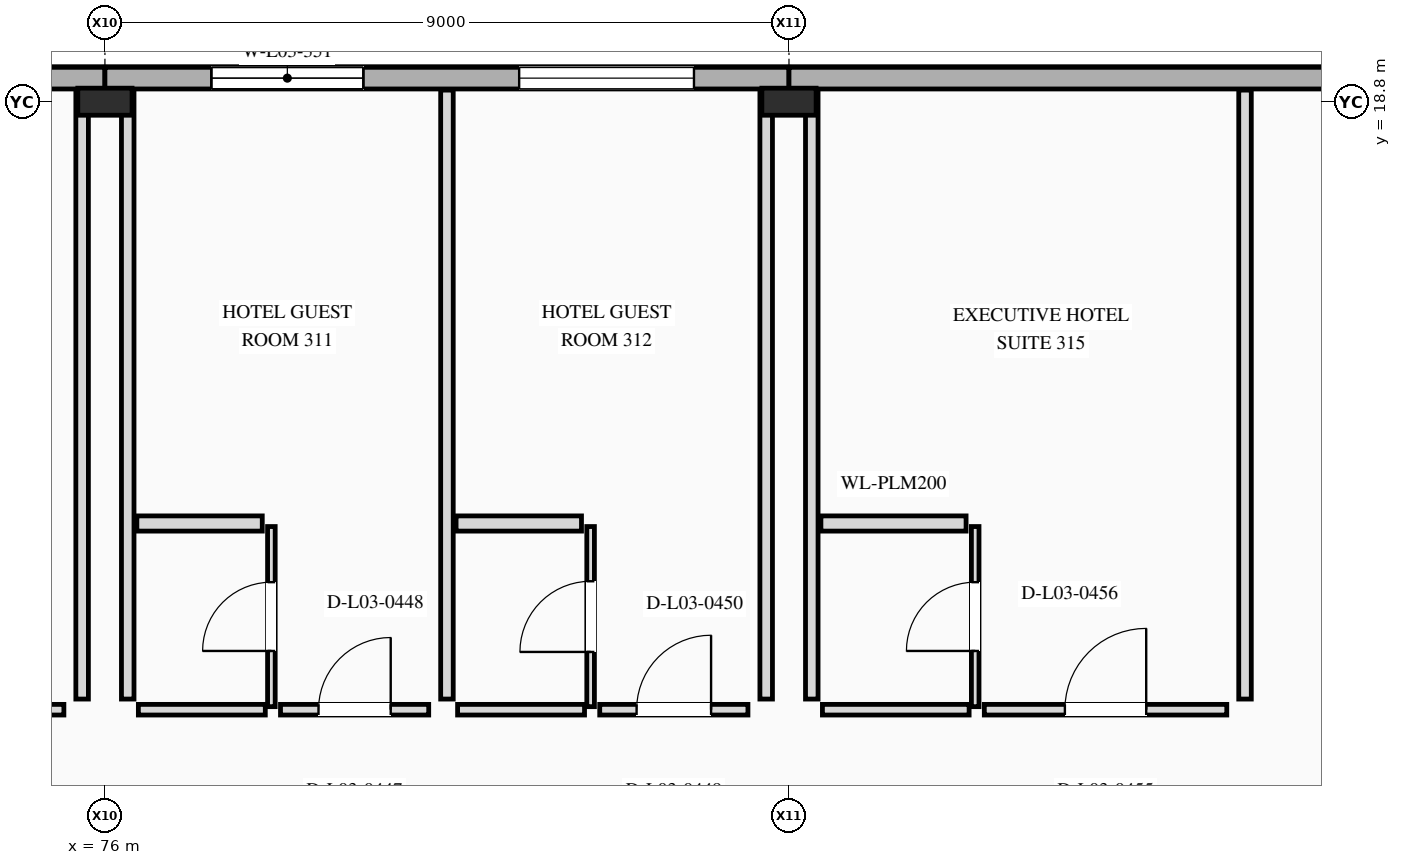
"""IFC4 building model, lengths in metres.
Left out: names, types, materials, properties, quantities, classifications, styles, units other than length and angle.
Written with IfcOpenShell. Run it as: python <this file> out.ifc"""

import sys

from ifc_helpers import new_model, si_unit, direction, frame, frame_2d, origin, origin_2d, place, context, subcontext, project, spatial, rectangle, i_section, extrude, element, fill, save


model = new_model("IFC4")
c1 = context("Model", 3, precision=1e-05, world=origin(), true_north=direction((0.0, 1.0)))
c2 = subcontext(c1, "Body", "Model", "MODEL_VIEW")
j1 = project(units=[si_unit("LENGTHUNIT", "METRE"), si_unit("PLANEANGLEUNIT", "RADIAN")], contexts=[c1])
p1 = place(None, origin())
s1 = spatial("IfcSite", under=j1, at=p1, CompositionType="ELEMENT")
p2 = place(p1, origin())
s2 = spatial("IfcBuilding", under=s1, at=p2, CompositionType="ELEMENT")
p3 = place(p2, frame((0.0, 0.0, 15.6)))
s3 = spatial("IfcBuildingStorey", under=s2, at=p3, CompositionType="ELEMENT", Elevation=15.6)
for number, where, z_axis, x_axis in (
    (1, (76.0, 18.8, 0.0), (0.0, 0.0, 1.0), (0.0, 1.0, 0.0)),
    (2, (85.0, 18.8, 0.0), (0.0, 0.0, 1.0), (0.0, 1.0, 0.0)),
):
    element("IfcColumn", number, at=place(p3, frame(where, z_axis=z_axis, x_axis=x_axis)), inside=s3, PredefinedType="COLUMN", context=c2, shape_type="SweptSolid", body=[
        extrude(i_section(OverallWidth=0.356, OverallDepth=0.714, WebThickness=0.019, FlangeThickness=0.034, at=origin_2d()), origin(), (0.0, 0.0, 1.0), 3.9),
    ])
p4 = place(p3, frame((76.0, 19.11, 0.0), z_axis=(0.0, 0.0, 1.0), x_axis=(-1.0, 0.0, 0.0)))
e3 = element("IfcWall", 3, at=p4, inside=s3, PredefinedType="STANDARD", context=c2, shape_type="SweptSolid", body=[
    extrude(rectangle(XDim=9.0, YDim=0.285, at=frame_2d((4.5, 0.0))), origin(), (0.0, 0.0, 1.0), 3.9),
])
p5 = place(p4, frame((3.675, 0.0, 0.85)))
e4 = element("IfcOpeningElement", 4, at=p5, cuts=e3, PredefinedType="OPENING", context=c2, shape_type="SweptSolid", body=[
    extrude(rectangle(XDim=1.65, YDim=1.75, at=frame_2d((0.825, 0.875))), frame((0.0, 0.152, 0.0), z_axis=(0.0, -1.0, 0.0), x_axis=(1.0, 0.0, 0.0)), (0.0, 0.0, 1.0), 0.305),
])
p6 = place(p3, frame((85.0, 19.11, 0.0), z_axis=(0.0, 0.0, 1.0), x_axis=(-1.0, 0.0, 0.0)))
e5 = element("IfcWall", 5, at=p6, inside=s3, PredefinedType="STANDARD", context=c2, shape_type="SweptSolid", body=[
    extrude(rectangle(XDim=9.0, YDim=0.285, at=frame_2d((4.5, 0.0))), origin(), (0.0, 0.0, 1.0), 3.9),
])
p7 = place(p6, frame((5.6, 0.0, 0.85)))
e6 = element("IfcOpeningElement", 6, at=p7, cuts=e5, PredefinedType="OPENING", context=c2, shape_type="SweptSolid", body=[
    extrude(rectangle(XDim=2.0, YDim=1.65, at=frame_2d((1.0, 0.825))), frame((0.0, 0.152, 0.0), z_axis=(0.0, -1.0, 0.0), x_axis=(1.0, 0.0, 0.0)), (0.0, 0.0, 1.0), 0.305),
])
p8 = place(p6, frame((1.25, 0.0, 0.85)))
e7 = element("IfcOpeningElement", 7, at=p8, cuts=e5, PredefinedType="OPENING", context=c2, shape_type="SweptSolid", body=[
    extrude(rectangle(XDim=2.3, YDim=1.7, at=frame_2d((1.15, 0.85))), frame((0.0, 0.152, 0.0), z_axis=(0.0, -1.0, 0.0), x_axis=(1.0, 0.0, 0.0)), (0.0, 0.0, 1.0), 0.305),
])
p9 = place(p3, frame((94.0, 19.11, 0.0), z_axis=(0.0, 0.0, 1.0), x_axis=(-1.0, 0.0, 0.0)))
e8 = element("IfcWall", 8, at=p9, inside=s3, PredefinedType="STANDARD", context=c2, shape_type="SweptSolid", body=[
    extrude(rectangle(XDim=9.0, YDim=0.285, at=frame_2d((4.5, 0.0))), origin(), (0.0, 0.0, 1.0), 3.9),
])
p10 = place(p3, frame((76.44, 10.8, 0.0), z_axis=(0.0, 0.0, 1.0), x_axis=(1.0, 0.0, 0.0)))
e9 = element("IfcWall", 9, at=p10, inside=s3, PredefinedType="PARTITIONING", context=c2, shape_type="SweptSolid", body=[
    extrude(rectangle(XDim=1.67, YDim=0.14, at=frame_2d((0.835, 0.0))), origin(), (0.0, 0.0, 1.0), 3.6),
])
p11 = place(p3, frame((78.31, 10.8, 0.0), z_axis=(0.0, 0.0, 1.0), x_axis=(1.0, 0.0, 0.0)))
e10 = element("IfcWall", 10, at=p11, inside=s3, PredefinedType="PARTITIONING", context=c2, shape_type="SweptSolid", body=[
    extrude(rectangle(XDim=1.95, YDim=0.14, at=frame_2d((0.975, 0.0))), origin(), (0.0, 0.0, 1.0), 3.6),
])
p12 = place(p11, frame((0.5, 0.0, 0.0)))
e11 = element("IfcOpeningElement", 11, at=p12, cuts=e10, PredefinedType="OPENING", context=c2, shape_type="SweptSolid", body=[
    extrude(rectangle(XDim=0.95, YDim=2.15, at=frame_2d((0.475, 1.075))), frame((0.0, 0.08, 0.0), z_axis=(0.0, -1.0, 0.0), x_axis=(1.0, 0.0, 0.0)), (0.0, 0.0, 1.0), 0.16),
])
p13 = place(p3, frame((76.3, 10.94, 0.0), z_axis=(0.0, 0.0, 1.0), x_axis=(0.0, 1.0, 0.0)))
e12 = element("IfcWall", 12, at=p13, inside=s3, PredefinedType="PARTITIONING", context=c2, shape_type="SweptSolid", body=[
    extrude(rectangle(XDim=8.012, YDim=0.165, at=frame_2d((4.006, 0.0))), origin(), (0.0, 0.0, 1.0), 2.929),
])
p14 = place(p3, frame((80.5, 10.94, 0.0), z_axis=(0.0, 0.0, 1.0), x_axis=(0.0, 1.0, 0.0)))
e13 = element("IfcWall", 13, at=p14, inside=s3, PredefinedType="PARTITIONING", context=c2, shape_type="SweptSolid", body=[
    extrude(rectangle(XDim=8.012, YDim=0.165, at=frame_2d((4.006, 0.0))), origin(), (0.0, 0.0, 1.0), 3.013),
])
p15 = place(p3, frame((78.19, 10.84, 0.0), z_axis=(0.0, 0.0, 1.0), x_axis=(0.0, 1.0, 0.0)))
e14 = element("IfcWall", 14, at=p15, inside=s3, PredefinedType="PARTITIONING", context=c2, shape_type="SweptSolid", body=[
    extrude(rectangle(XDim=2.37, YDim=0.1, at=frame_2d((1.185, 0.0))), origin(), (0.0, 0.0, 1.0), 3.208),
])
p16 = place(p15, frame((0.733, 0.0, 0.0)))
e15 = element("IfcOpeningElement", 15, at=p16, cuts=e14, PredefinedType="OPENING", context=c2, shape_type="SweptSolid", body=[
    extrude(rectangle(XDim=0.905, YDim=2.18, at=frame_2d((0.453, 1.09))), frame((0.0, 0.06, 0.0), z_axis=(0.0, -1.0, 0.0), x_axis=(1.0, 0.0, 0.0)), (0.0, 0.0, 1.0), 0.12),
])
p17 = place(p3, frame((76.42, 13.25, 0.0), z_axis=(0.0, 0.0, 1.0), x_axis=(1.0, 0.0, 0.0)))
e16 = element("IfcWall", 16, at=p17, inside=s3, PredefinedType="PLUMBINGWALL", context=c2, shape_type="SweptSolid", body=[
    extrude(rectangle(XDim=1.65, YDim=0.2, at=frame_2d((0.825, 0.0))), origin(), (0.0, 0.0, 1.0), 3.6),
])
p18 = place(p3, frame((80.64, 10.8, 0.0), z_axis=(0.0, 0.0, 1.0), x_axis=(1.0, 0.0, 0.0)))
e17 = element("IfcWall", 17, at=p18, inside=s3, PredefinedType="PARTITIONING", context=c2, shape_type="SweptSolid", body=[
    extrude(rectangle(XDim=1.67, YDim=0.14, at=frame_2d((0.835, 0.0))), origin(), (0.0, 0.0, 1.0), 3.6),
])
p19 = place(p3, frame((82.51, 10.8, 0.0), z_axis=(0.0, 0.0, 1.0), x_axis=(1.0, 0.0, 0.0)))
e18 = element("IfcWall", 18, at=p19, inside=s3, PredefinedType="PARTITIONING", context=c2, shape_type="SweptSolid", body=[
    extrude(rectangle(XDim=1.95, YDim=0.14, at=frame_2d((0.975, 0.0))), origin(), (0.0, 0.0, 1.0), 3.6),
])
p20 = place(p19, frame((0.485, 0.0, 0.0)))
e19 = element("IfcOpeningElement", 19, at=p20, cuts=e18, PredefinedType="OPENING", context=c2, shape_type="SweptSolid", body=[
    extrude(rectangle(XDim=0.98, YDim=2.2, at=frame_2d((0.49, 1.1))), frame((0.0, 0.08, 0.0), z_axis=(0.0, -1.0, 0.0), x_axis=(1.0, 0.0, 0.0)), (0.0, 0.0, 1.0), 0.16),
])
p21 = place(p3, frame((84.7, 10.94, 0.0), z_axis=(0.0, 0.0, 1.0), x_axis=(0.0, 1.0, 0.0)))
e20 = element("IfcWall", 20, at=p21, inside=s3, PredefinedType="PARTITIONING", context=c2, shape_type="SweptSolid", body=[
    extrude(rectangle(XDim=8.012, YDim=0.165, at=frame_2d((4.006, 0.0))), origin(), (0.0, 0.0, 1.0), 2.929),
])
p22 = place(p3, frame((82.39, 10.84, 0.0), z_axis=(0.0, 0.0, 1.0), x_axis=(0.0, 1.0, 0.0)))
e21 = element("IfcWall", 21, at=p22, inside=s3, PredefinedType="PARTITIONING", context=c2, shape_type="SweptSolid", body=[
    extrude(rectangle(XDim=2.37, YDim=0.1, at=frame_2d((1.185, 0.0))), origin(), (0.0, 0.0, 1.0), 3.208),
])
p23 = place(p22, frame((0.72, 0.0, 0.0)))
e22 = element("IfcOpeningElement", 22, at=p23, cuts=e21, PredefinedType="OPENING", context=c2, shape_type="SweptSolid", body=[
    extrude(rectangle(XDim=0.93, YDim=2.22, at=frame_2d((0.465, 1.11))), frame((0.0, 0.06, 0.0), z_axis=(0.0, -1.0, 0.0), x_axis=(1.0, 0.0, 0.0)), (0.0, 0.0, 1.0), 0.12),
])
p24 = place(p3, frame((80.62, 13.25, 0.0), z_axis=(0.0, 0.0, 1.0), x_axis=(1.0, 0.0, 0.0)))
e23 = element("IfcWall", 23, at=p24, inside=s3, PredefinedType="PLUMBINGWALL", context=c2, shape_type="SweptSolid", body=[
    extrude(rectangle(XDim=1.65, YDim=0.2, at=frame_2d((0.825, 0.0))), origin(), (0.0, 0.0, 1.0), 3.6),
])
p25 = place(p3, frame((85.44, 10.8, 0.0), z_axis=(0.0, 0.0, 1.0), x_axis=(1.0, 0.0, 0.0)))
e24 = element("IfcWall", 24, at=p25, inside=s3, PredefinedType="PARTITIONING", context=c2, shape_type="SweptSolid", body=[
    extrude(rectangle(XDim=1.93, YDim=0.14, at=frame_2d((0.965, 0.0))), origin(), (0.0, 0.0, 1.0), 3.6),
])
p26 = place(p3, frame((87.57, 10.8, 0.0), z_axis=(0.0, 0.0, 1.0), x_axis=(1.0, 0.0, 0.0)))
e25 = element("IfcWall", 25, at=p26, inside=s3, PredefinedType="PARTITIONING", context=c2, shape_type="SweptSolid", body=[
    extrude(rectangle(XDim=3.19, YDim=0.14, at=frame_2d((1.595, 0.0))), origin(), (0.0, 0.0, 1.0), 3.6),
])
p27 = place(p26, frame((1.06, 0.0, 0.0)))
e26 = element("IfcOpeningElement", 26, at=p27, cuts=e25, PredefinedType="OPENING", context=c2, shape_type="SweptSolid", body=[
    extrude(rectangle(XDim=1.07, YDim=2.25, at=frame_2d((0.535, 1.125))), frame((0.0, 0.08, 0.0), z_axis=(0.0, -1.0, 0.0), x_axis=(1.0, 0.0, 0.0)), (0.0, 0.0, 1.0), 0.16),
])
p28 = place(p3, frame((85.3, 10.94, 0.0), z_axis=(0.0, 0.0, 1.0), x_axis=(0.0, 1.0, 0.0)))
e27 = element("IfcWall", 27, at=p28, inside=s3, PredefinedType="PARTITIONING", context=c2, shape_type="SweptSolid", body=[
    extrude(rectangle(XDim=8.012, YDim=0.165, at=frame_2d((4.006, 0.0))), origin(), (0.0, 0.0, 1.0), 2.929),
])
p29 = place(p3, frame((91.0, 10.94, 0.0), z_axis=(0.0, 0.0, 1.0), x_axis=(0.0, 1.0, 0.0)))
e28 = element("IfcWall", 28, at=p29, inside=s3, PredefinedType="PARTITIONING", context=c2, shape_type="SweptSolid", body=[
    extrude(rectangle(XDim=8.012, YDim=0.165, at=frame_2d((4.006, 0.0))), origin(), (0.0, 0.0, 1.0), 3.6),
])
p30 = place(p3, frame((87.45, 10.84, 0.0), z_axis=(0.0, 0.0, 1.0), x_axis=(0.0, 1.0, 0.0)))
e29 = element("IfcWall", 29, at=p30, inside=s3, PredefinedType="PARTITIONING", context=c2, shape_type="SweptSolid", body=[
    extrude(rectangle(XDim=2.37, YDim=0.1, at=frame_2d((1.185, 0.0))), origin(), (0.0, 0.0, 1.0), 3.6),
])
p31 = place(p30, frame((0.733, 0.0, 0.0)))
e30 = element("IfcOpeningElement", 30, at=p31, cuts=e29, PredefinedType="OPENING", context=c2, shape_type="SweptSolid", body=[
    extrude(rectangle(XDim=0.905, YDim=2.1, at=frame_2d((0.453, 1.05))), frame((0.0, 0.06, 0.0), z_axis=(0.0, -1.0, 0.0), x_axis=(1.0, 0.0, 0.0)), (0.0, 0.0, 1.0), 0.12),
])
p32 = place(p3, frame((85.42, 13.25, 0.0), z_axis=(0.0, 0.0, 1.0), x_axis=(1.0, 0.0, 0.0)))
e31 = element("IfcWall", 31, at=p32, inside=s3, PredefinedType="PLUMBINGWALL", context=c2, shape_type="SweptSolid", body=[
    extrude(rectangle(XDim=1.91, YDim=0.2, at=frame_2d((0.955, 0.0))), origin(), (0.0, 0.0, 1.0), 3.6),
])
p33 = place(p3, frame((67.54, 10.8, 0.0), z_axis=(0.0, 0.0, 1.0), x_axis=(1.0, 0.0, 0.0)))
e32 = element("IfcWall", 32, at=p33, inside=s3, PredefinedType="PARTITIONING", context=c2, shape_type="SweptSolid", body=[
    extrude(rectangle(XDim=7.92, YDim=0.14, at=frame_2d((3.96, 0.0))), origin(), (0.0, 0.0, 1.0), 3.6),
])
p34 = place(p33, frame((3.47, 0.0, 0.0)))
e33 = element("IfcOpeningElement", 33, at=p34, cuts=e32, PredefinedType="OPENING", context=c2, shape_type="SweptSolid", body=[
    extrude(rectangle(XDim=0.98, YDim=2.2, at=frame_2d((0.49, 1.1))), frame((0.0, 0.08, 0.0), z_axis=(0.0, -1.0, 0.0), x_axis=(1.0, 0.0, 0.0)), (0.0, 0.0, 1.0), 0.16),
])
p35 = place(p3, frame((75.7, 10.94, 0.0), z_axis=(0.0, 0.0, 1.0), x_axis=(0.0, 1.0, 0.0)))
e34 = element("IfcWall", 34, at=p35, inside=s3, PredefinedType="PARTITIONING", context=c2, shape_type="SweptSolid", body=[
    extrude(rectangle(XDim=8.012, YDim=0.165, at=frame_2d((4.006, 0.0))), origin(), (0.0, 0.0, 1.0), 2.929),
])
p36 = place(p7, origin())
e35 = element("IfcWindow", 35, at=p36, inside=s3, PartitioningType="SINGLE_PANEL", PredefinedType="WINDOW", context=c2, shape_type="SweptSolid", body=[
    extrude(rectangle(XDim=2.0, YDim=1.65, at=frame_2d((1.0, 0.825))), frame((0.0, 0.03, 0.0), z_axis=(0.0, -1.0, 0.0), x_axis=(1.0, 0.0, 0.0)), (0.0, 0.0, 1.0), 0.06),
])
fill(e6, e35)
p37 = place(p8, origin())
e36 = element("IfcWindow", 36, at=p37, inside=s3, PartitioningType="SINGLE_PANEL", PredefinedType="WINDOW", context=c2, shape_type="SweptSolid", body=[
    extrude(rectangle(XDim=2.3, YDim=1.7, at=frame_2d((1.15, 0.85))), frame((0.0, 0.03, 0.0), z_axis=(0.0, -1.0, 0.0), x_axis=(1.0, 0.0, 0.0)), (0.0, 0.0, 1.0), 0.06),
])
fill(e7, e36)
p38 = place(p12, origin())
e37 = element("IfcDoor", 37, at=p38, inside=s3, OperationType="SINGLE_SWING_RIGHT", PredefinedType="DOOR", context=c2, shape_type="SweptSolid", body=[
    extrude(rectangle(XDim=0.95, YDim=2.15, at=frame_2d((0.475, 1.075))), frame((0.0, 0.025, 0.0), z_axis=(0.0, -1.0, 0.0), x_axis=(1.0, 0.0, 0.0)), (0.0, 0.0, 1.0), 0.05),
])
fill(e11, e37)
p39 = place(p16, origin())
e38 = element("IfcDoor", 38, at=p39, inside=s3, OperationType="SINGLE_SWING_LEFT", PredefinedType="DOOR", context=c2, shape_type="SweptSolid", body=[
    extrude(rectangle(XDim=0.905, YDim=2.18, at=frame_2d((0.453, 1.09))), frame((0.0, 0.025, 0.0), z_axis=(0.0, -1.0, 0.0), x_axis=(1.0, 0.0, 0.0)), (0.0, 0.0, 1.0), 0.05),
])
fill(e15, e38)
p40 = place(p20, origin())
e39 = element("IfcDoor", 39, at=p40, inside=s3, OperationType="SINGLE_SWING_RIGHT", PredefinedType="DOOR", context=c2, shape_type="SweptSolid", body=[
    extrude(rectangle(XDim=0.98, YDim=2.2, at=frame_2d((0.49, 1.1))), frame((0.0, 0.025, 0.0), z_axis=(0.0, -1.0, 0.0), x_axis=(1.0, 0.0, 0.0)), (0.0, 0.0, 1.0), 0.05),
])
fill(e19, e39)
p41 = place(p23, origin())
e40 = element("IfcDoor", 40, at=p41, inside=s3, OperationType="SINGLE_SWING_LEFT", PredefinedType="DOOR", context=c2, shape_type="SweptSolid", body=[
    extrude(rectangle(XDim=0.93, YDim=2.22, at=frame_2d((0.465, 1.11))), frame((0.0, 0.025, 0.0), z_axis=(0.0, -1.0, 0.0), x_axis=(1.0, 0.0, 0.0)), (0.0, 0.0, 1.0), 0.05),
])
fill(e22, e40)
p42 = place(p27, origin())
e41 = element("IfcDoor", 41, at=p42, inside=s3, OperationType="SINGLE_SWING_RIGHT", PredefinedType="DOOR", context=c2, shape_type="SweptSolid", body=[
    extrude(rectangle(XDim=1.07, YDim=2.25, at=frame_2d((0.535, 1.125))), frame((0.0, 0.025, 0.0), z_axis=(0.0, -1.0, 0.0), x_axis=(1.0, 0.0, 0.0)), (0.0, 0.0, 1.0), 0.05),
])
fill(e26, e41)
p43 = place(p31, origin())
e42 = element("IfcDoor", 42, at=p43, inside=s3, OperationType="SINGLE_SWING_LEFT", PredefinedType="DOOR", context=c2, shape_type="SweptSolid", body=[
    extrude(rectangle(XDim=0.905, YDim=2.1, at=frame_2d((0.453, 1.05))), frame((0.0, 0.025, 0.0), z_axis=(0.0, -1.0, 0.0), x_axis=(1.0, 0.0, 0.0)), (0.0, 0.0, 1.0), 0.05),
])
fill(e30, e42)
save(model, sys.argv[1])
